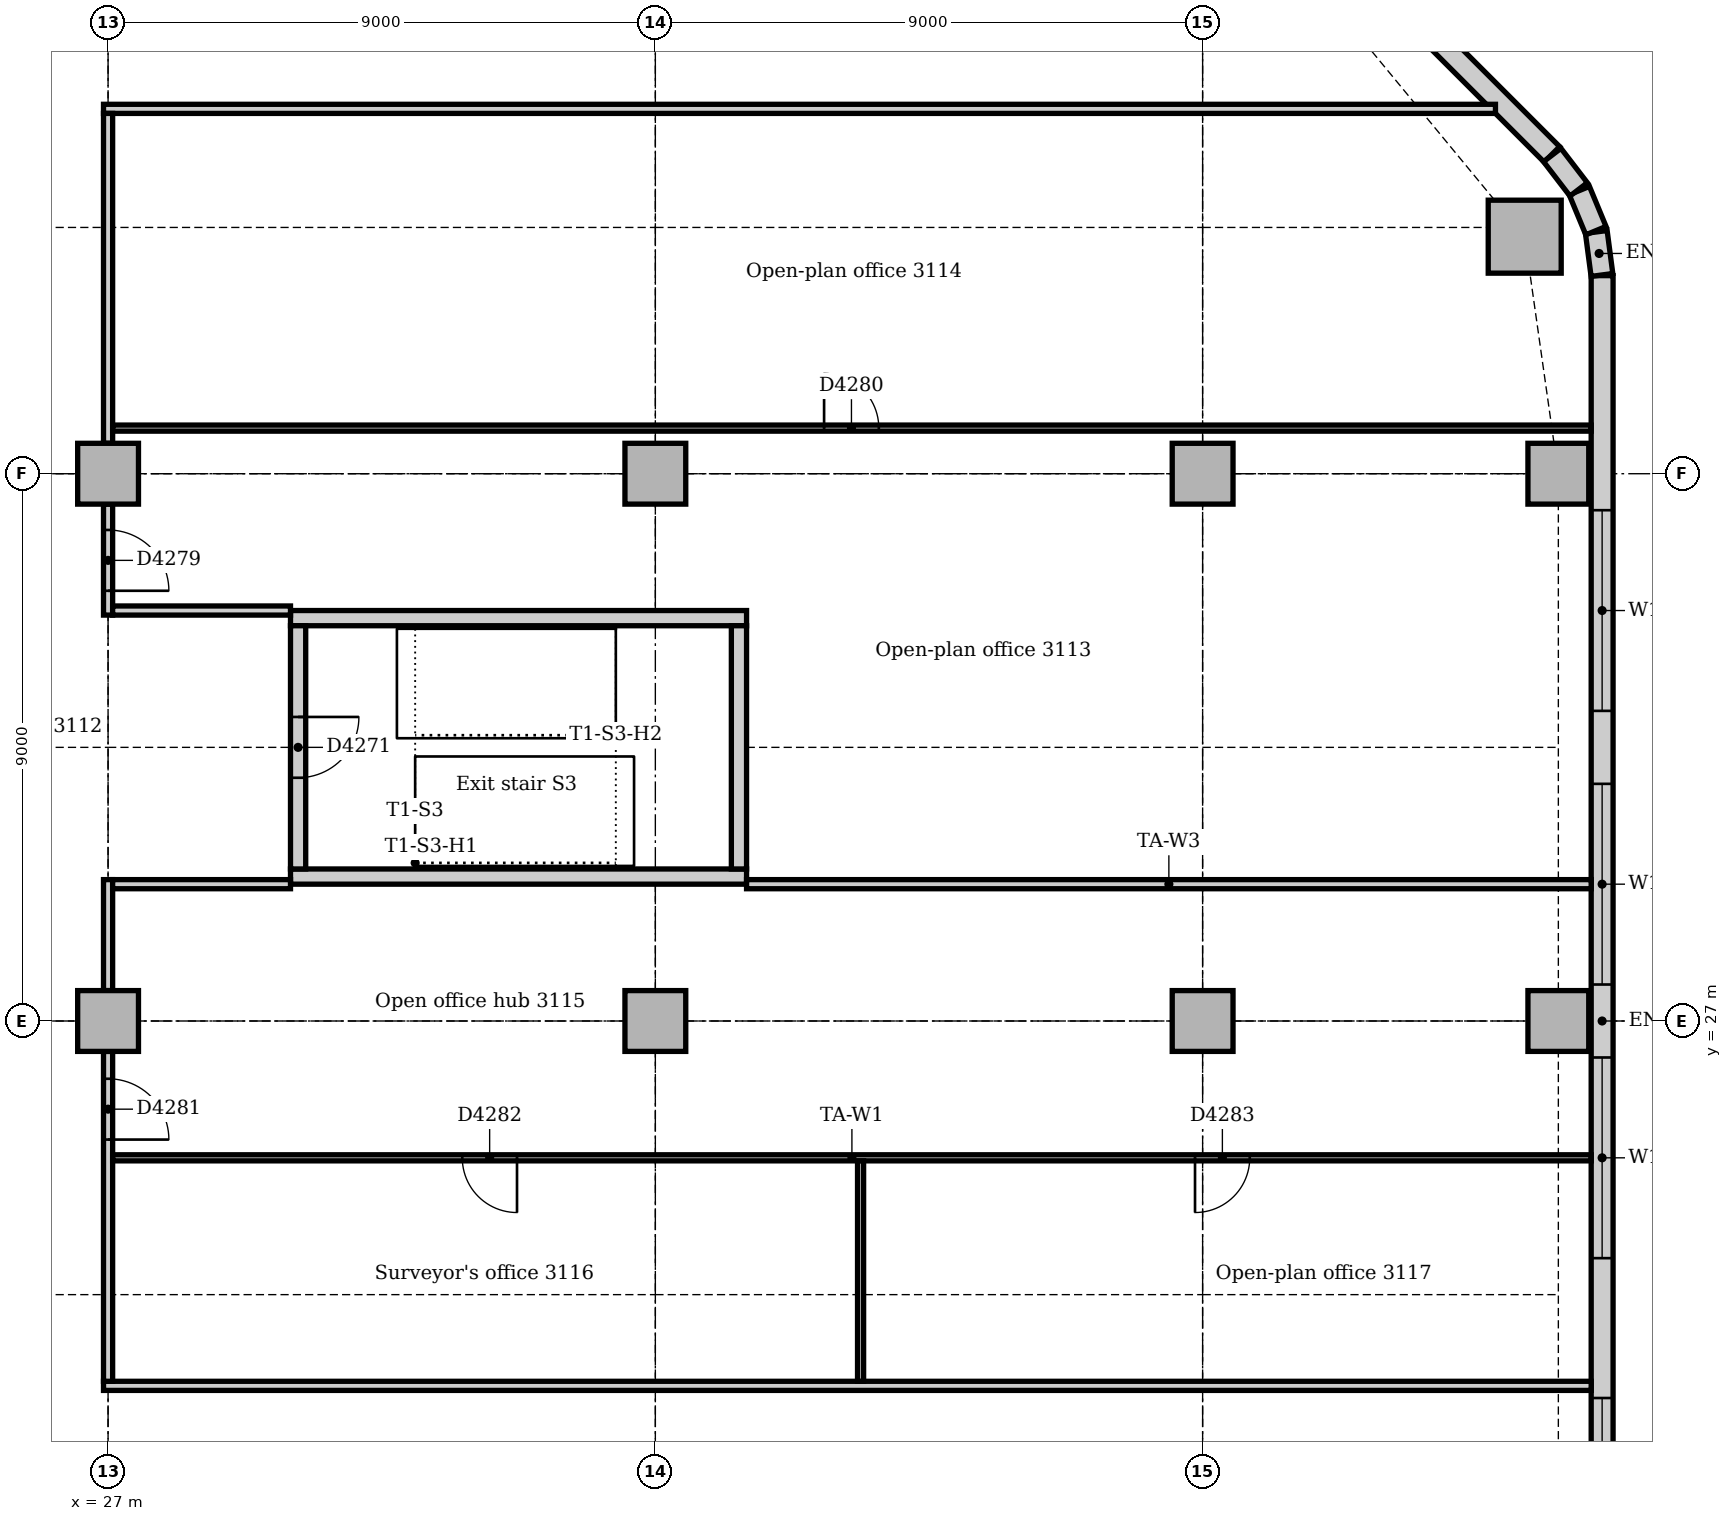
"""IFC4 building model, lengths in metres.
Left out: names, types, materials, properties, quantities, classifications, styles, units other than length and angle.
Written with IfcOpenShell. Run it as: python <this file> out.ifc"""

import sys

from ifc_helpers import new_model, si_unit, direction, frame, frame_2d, origin, origin_2d, place, context, subcontext, project, spatial, rectangle, extrude, element, fill, save


model = new_model("IFC4")
c1 = context("Model", 3, precision=1e-05, world=origin(), true_north=direction((0.0, 1.0)))
c2 = subcontext(c1, "Body", "Model", "MODEL_VIEW")
j1 = project(units=[si_unit("LENGTHUNIT", "METRE"), si_unit("PLANEANGLEUNIT", "RADIAN")], contexts=[c1])
p1 = place(None, origin())
s1 = spatial("IfcSite", under=j1, at=p1, CompositionType="ELEMENT")
p2 = place(p1, origin())
s2 = spatial("IfcBuilding", under=s1, at=p2, CompositionType="ELEMENT")
p3 = place(p2, frame((0.0, 0.0, 132.0)))
s3 = spatial("IfcBuildingStorey", under=s2, at=p3, CompositionType="ELEMENT", Elevation=132.0)
for number, where, z_axis, x_axis in (
    (1, (30.0, 29.375, 0.0), (0.0, 0.0, 1.0), (1.0, 0.0, 0.0)),
    (2, (37.5, 33.625, 0.0), (0.0, 0.0, 1.0), (-1.0, 0.0, 0.0)),
):
    element("IfcWall", number, at=place(p3, frame(where, z_axis=z_axis, x_axis=x_axis)), inside=s3, PredefinedType="SOLIDWALL", context=c2, shape_type="SweptSolid", body=[
        extrude(rectangle(XDim=7.5, YDim=0.25, at=frame_2d((3.75, 0.0))), origin(), (0.0, 0.0, 1.0), 4.0),
    ])
p4 = place(p3, frame((37.375, 29.5, 0.0), z_axis=(0.0, 0.0, 1.0), x_axis=(0.0, 1.0, 0.0)))
e3 = element("IfcWall", 3, at=p4, inside=s3, PredefinedType="SOLIDWALL", context=c2, shape_type="SweptSolid", body=[
    extrude(rectangle(XDim=4.0, YDim=0.25, at=frame_2d((2.0, 0.0))), origin(), (0.0, 0.0, 1.0), 4.0),
])
p5 = place(p3, frame((30.125, 33.5, 0.0), z_axis=(0.0, 0.0, 1.0), x_axis=(0.0, -1.0, 0.0)))
e4 = element("IfcWall", 4, at=p5, inside=s3, PredefinedType="SOLIDWALL", context=c2, shape_type="SweptSolid", body=[
    extrude(rectangle(XDim=4.0, YDim=0.25, at=frame_2d((2.0, 0.0))), origin(), (0.0, 0.0, 1.0), 4.0),
])
p6 = place(p5, frame((1.5, 0.0, 0.0)))
e5 = element("IfcOpeningElement", 5, at=p6, cuts=e4, PredefinedType="OPENING", context=c2, shape_type="SweptSolid", body=[
    extrude(rectangle(XDim=1.0, YDim=2.1, at=frame_2d((0.5, 1.05))), frame((0.0, 0.135, 0.0), z_axis=(0.0, -1.0, 0.0), x_axis=(1.0, 0.0, 0.0)), (0.0, 0.0, 1.0), 0.27),
])
p7 = place(p3, frame((50.297, 39.898, 0.0), z_axis=(0.0, 0.0, 1.0), x_axis=(1.0, 0.0, 0.0)))
e6 = element("IfcColumn", 6, at=p7, inside=s3, PredefinedType="COLUMN", context=c2, shape_type="SweptSolid", body=[
    extrude(rectangle(XDim=1.2, YDim=1.2, at=origin_2d()), origin(), (0.0, 0.0, 1.0), 3.85),
])
for number, where, z_axis, x_axis in (
    (7, (50.85, 27.0, 0.0), (0.0, 0.0, 1.0), (1.0, 0.0, 0.0)),
    (8, (50.85, 36.0, 0.0), (0.0, 0.0, 1.0), (1.0, 0.0, 0.0)),
    (9, (27.0, 27.0, 0.0), (0.0, 0.0, 1.0), (1.0, 0.0, 0.0)),
    (10, (27.0, 36.0, 0.0), (0.0, 0.0, 1.0), (1.0, 0.0, 0.0)),
    (11, (36.0, 27.0, 0.0), (0.0, 0.0, 1.0), (1.0, 0.0, 0.0)),
    (12, (36.0, 36.0, 0.0), (0.0, 0.0, 1.0), (1.0, 0.0, 0.0)),
    (13, (45.0, 27.0, 0.0), (0.0, 0.0, 1.0), (1.0, 0.0, 0.0)),
    (14, (45.0, 36.0, 0.0), (0.0, 0.0, 1.0), (1.0, 0.0, 0.0)),
):
    element("IfcColumn", number, at=place(p3, frame(where, z_axis=z_axis, x_axis=x_axis)), inside=s3, PredefinedType="COLUMN", context=c2, shape_type="SweptSolid", body=[
        extrude(rectangle(XDim=1.0, YDim=1.0, at=origin_2d()), origin(), (0.0, 0.0, 1.0), 3.85),
    ])
p8 = place(p3, frame((51.57, 14.743, 0.0), z_axis=(0.0, 0.0, 1.0), x_axis=(0.0, 1.0, 0.0)))
e15 = element("IfcWall", 15, at=p8, inside=s3, PredefinedType="STANDARD", context=c2, shape_type="SweptSolid", body=[
    extrude(rectangle(XDim=24.515, YDim=0.36, at=frame_2d((12.257, 0.0))), origin(), (0.0, 0.0, 1.0), 3.85),
])
p9 = place(p8, frame((4.257, 0.0, 0.9)))
e16 = element("IfcOpeningElement", 16, at=p9, cuts=e15, PredefinedType="OPENING", context=c2, shape_type="SweptSolid", body=[
    extrude(rectangle(XDim=1.8, YDim=1.6, at=frame_2d((0.9, 0.8))), frame((0.0, 0.19, 0.0), z_axis=(0.0, -1.0, 0.0), x_axis=(1.0, 0.0, 0.0)), (0.0, 0.0, 1.0), 0.38),
])
p10 = place(p8, frame((8.357, 0.0, 0.9)))
e17 = element("IfcOpeningElement", 17, at=p10, cuts=e15, PredefinedType="OPENING", context=c2, shape_type="SweptSolid", body=[
    extrude(rectangle(XDim=3.3, YDim=1.6, at=frame_2d((1.65, 0.8))), frame((0.0, 0.19, 0.0), z_axis=(0.0, -1.0, 0.0), x_axis=(1.0, 0.0, 0.0)), (0.0, 0.0, 1.0), 0.38),
])
p11 = place(p8, frame((12.857, 0.0, 0.9)))
e18 = element("IfcOpeningElement", 18, at=p11, cuts=e15, PredefinedType="OPENING", context=c2, shape_type="SweptSolid", body=[
    extrude(rectangle(XDim=3.3, YDim=1.6, at=frame_2d((1.65, 0.8))), frame((0.0, 0.19, 0.0), z_axis=(0.0, -1.0, 0.0), x_axis=(1.0, 0.0, 0.0)), (0.0, 0.0, 1.0), 0.38),
])
p12 = place(p8, frame((17.357, 0.0, 0.9)))
e19 = element("IfcOpeningElement", 19, at=p12, cuts=e15, PredefinedType="OPENING", context=c2, shape_type="SweptSolid", body=[
    extrude(rectangle(XDim=3.3, YDim=1.6, at=frame_2d((1.65, 0.8))), frame((0.0, 0.19, 0.0), z_axis=(0.0, -1.0, 0.0), x_axis=(1.0, 0.0, 0.0)), (0.0, 0.0, 1.0), 0.38),
])
p13 = place(p3, frame((50.744, 41.251, 0.0), z_axis=(0.0, 0.0, 1.0), x_axis=(-0.707106781187, 0.707106781187, 0.0)))
e20 = element("IfcWall", 20, at=p13, inside=s3, PredefinedType="STANDARD", context=c2, shape_type="SweptSolid", body=[
    extrude(rectangle(XDim=10.243, YDim=0.36, at=frame_2d((5.121, 0.0))), origin(), (0.0, 0.0, 1.0), 3.85),
])
p14 = place(p13, frame((3.071, 0.0, 0.9)))
e21 = element("IfcOpeningElement", 21, at=p14, cuts=e20, PredefinedType="OPENING", context=c2, shape_type="SweptSolid", body=[
    extrude(rectangle(XDim=3.3, YDim=1.6, at=frame_2d((1.65, 0.8))), frame((0.0, 0.19, 0.0), z_axis=(0.0, -1.0, 0.0), x_axis=(1.0, 0.0, 0.0)), (0.0, 0.0, 1.0), 0.38),
])
for number, where, z_axis, x_axis in (
    (22, (51.567, 39.269, 0.0), (0.0, 0.0, 1.0), (-0.131, 0.991, 0.0)),
    (23, (51.468, 39.997, 0.0), (0.0, 0.0, 1.0), (-0.383, 0.924, 0.0)),
):
    element("IfcWall", number, at=place(p3, frame(where, z_axis=z_axis, x_axis=x_axis)), inside=s3, PredefinedType="STANDARD", context=c2, shape_type="SweptSolid", body=[
        extrude(rectangle(XDim=0.713, YDim=0.36, at=frame_2d((0.356, 0.0))), origin(), (0.0, 0.0, 1.0), 3.85),
    ])
p15 = place(p3, frame((51.184, 40.675, 0.0), z_axis=(0.0, 0.0, 1.0), x_axis=(-0.608802368033, 0.793321924995, 0.0)))
e24 = element("IfcWall", 24, at=p15, inside=s3, PredefinedType="STANDARD", context=c2, shape_type="SweptSolid", body=[
    extrude(rectangle(XDim=0.713, YDim=0.36, at=frame_2d((0.357, 0.0))), origin(), (0.0, 0.0, 1.0), 3.85),
])
p16 = place(p3, frame((26.925, 21.0, 0.0), z_axis=(0.0, 0.0, 1.0), x_axis=(1.0, 0.0, 0.0)))
e25 = element("IfcWall", 25, at=p16, inside=s3, PredefinedType="PARTITIONING", context=c2, shape_type="SweptSolid", body=[
    extrude(rectangle(XDim=24.465, YDim=0.15, at=frame_2d((12.232, 0.0))), origin(), (0.0, 0.0, 1.0), 3.85),
])
p17 = place(p3, frame((26.925, 42.0, 0.0), z_axis=(0.0, 0.0, 1.0), x_axis=(1.0, 0.0, 0.0)))
e26 = element("IfcWall", 26, at=p17, inside=s3, PredefinedType="PARTITIONING", context=c2, shape_type="SweptSolid", body=[
    extrude(rectangle(XDim=22.891, YDim=0.15, at=frame_2d((11.445, 0.0))), origin(), (0.0, 0.0, 1.0), 3.85),
])
p18 = place(p3, frame((27.0, 21.075, 0.0), z_axis=(0.0, 0.0, 1.0), x_axis=(0.0, 1.0, 0.0)))
e27 = element("IfcWall", 27, at=p18, inside=s3, PredefinedType="PARTITIONING", context=c2, shape_type="SweptSolid", body=[
    extrude(rectangle(XDim=5.425, YDim=0.15, at=frame_2d((2.712, 0.0))), origin(), (0.0, 0.0, 1.0), 3.256),
])
p19 = place(p18, frame((3.975, 0.0, 0.0)))
e28 = element("IfcOpeningElement", 28, at=p19, cuts=e27, PredefinedType="OPENING", context=c2, shape_type="SweptSolid", body=[
    extrude(rectangle(XDim=1.0, YDim=2.1, at=frame_2d((0.5, 1.05))), frame((0.0, 0.085, 0.0), z_axis=(0.0, -1.0, 0.0), x_axis=(1.0, 0.0, 0.0)), (0.0, 0.0, 1.0), 0.17),
])
p20 = place(p3, frame((27.0, 27.5, 0.0), z_axis=(0.0, 0.0, 1.0), x_axis=(0.0, 1.0, 0.0)))
e29 = element("IfcWall", 29, at=p20, inside=s3, PredefinedType="PARTITIONING", context=c2, shape_type="SweptSolid", body=[
    extrude(rectangle(XDim=1.825, YDim=0.15, at=frame_2d((0.912, 0.0))), origin(), (0.0, 0.0, 1.0), 3.256),
])
p21 = place(p3, frame((27.0, 33.675, 0.0), z_axis=(0.0, 0.0, 1.0), x_axis=(0.0, 1.0, 0.0)))
e30 = element("IfcWall", 30, at=p21, inside=s3, PredefinedType="PARTITIONING", context=c2, shape_type="SweptSolid", body=[
    extrude(rectangle(XDim=1.825, YDim=0.15, at=frame_2d((0.912, 0.0))), origin(), (0.0, 0.0, 1.0), 3.256),
])
p22 = place(p21, frame((0.4, 0.0, 0.0)))
e31 = element("IfcOpeningElement", 31, at=p22, cuts=e30, PredefinedType="OPENING", context=c2, shape_type="SweptSolid", body=[
    extrude(rectangle(XDim=1.0, YDim=2.1, at=frame_2d((0.5, 1.05))), frame((0.0, 0.085, 0.0), z_axis=(0.0, -1.0, 0.0), x_axis=(1.0, 0.0, 0.0)), (0.0, 0.0, 1.0), 0.17),
])
p23 = place(p3, frame((27.0, 36.5, 0.0), z_axis=(0.0, 0.0, 1.0), x_axis=(0.0, 1.0, 0.0)))
e32 = element("IfcWall", 32, at=p23, inside=s3, PredefinedType="PARTITIONING", context=c2, shape_type="SweptSolid", body=[
    extrude(rectangle(XDim=5.425, YDim=0.15, at=frame_2d((2.712, 0.0))), origin(), (0.0, 0.0, 1.0), 3.256),
])
for number, where, z_axis, x_axis in (
    (33, (27.075, 29.25, 0.0), (0.0, 0.0, 1.0), (1.0, 0.0, 0.0)),
    (34, (27.075, 33.75, 0.0), (0.0, 0.0, 1.0), (1.0, 0.0, 0.0)),
):
    element("IfcWall", number, at=place(p3, frame(where, z_axis=z_axis, x_axis=x_axis)), inside=s3, PredefinedType="PARTITIONING", context=c2, shape_type="SweptSolid", body=[
        extrude(rectangle(XDim=2.925, YDim=0.15, at=frame_2d((1.462, 0.0))), origin(), (0.0, 0.0, 1.0), 3.85),
    ])
p24 = place(p3, frame((37.5, 29.25, 0.0), z_axis=(0.0, 0.0, 1.0), x_axis=(1.0, 0.0, 0.0)))
e35 = element("IfcWall", 35, at=p24, inside=s3, PredefinedType="PARTITIONING", context=c2, shape_type="SweptSolid", body=[
    extrude(rectangle(XDim=13.89, YDim=0.15, at=frame_2d((6.945, 0.0))), origin(), (0.0, 0.0, 1.0), 3.85),
])
p25 = place(p3, frame((27.075, 24.75, 0.0), z_axis=(0.0, 0.0, 1.0), x_axis=(1.0, 0.0, 0.0)))
e36 = element("IfcWall", 36, at=p25, inside=s3, PredefinedType="PARTITIONING", context=c2, shape_type="SweptSolid", body=[
    extrude(rectangle(XDim=24.315, YDim=0.1, at=frame_2d((12.158, 0.0))), origin(), (0.0, 0.0, 1.0), 3.85),
])
p26 = place(p25, frame((5.75, 0.0, 0.0)))
e37 = element("IfcOpeningElement", 37, at=p26, cuts=e36, PredefinedType="OPENING", context=c2, shape_type="SweptSolid", body=[
    extrude(rectangle(XDim=0.9, YDim=2.1, at=frame_2d((0.45, 1.05))), frame((0.0, 0.06, 0.0), z_axis=(0.0, -1.0, 0.0), x_axis=(1.0, 0.0, 0.0)), (0.0, 0.0, 1.0), 0.12),
])
p27 = place(p25, frame((17.8, 0.0, 0.0)))
e38 = element("IfcOpeningElement", 38, at=p27, cuts=e36, PredefinedType="OPENING", context=c2, shape_type="SweptSolid", body=[
    extrude(rectangle(XDim=0.9, YDim=2.1, at=frame_2d((0.45, 1.05))), frame((0.0, 0.06, 0.0), z_axis=(0.0, -1.0, 0.0), x_axis=(1.0, 0.0, 0.0)), (0.0, 0.0, 1.0), 0.12),
])
p28 = place(p3, frame((27.075, 36.75, 0.0), z_axis=(0.0, 0.0, 1.0), x_axis=(1.0, 0.0, 0.0)))
e39 = element("IfcWall", 39, at=p28, inside=s3, PredefinedType="PARTITIONING", context=c2, shape_type="SweptSolid", body=[
    extrude(rectangle(XDim=24.315, YDim=0.1, at=frame_2d((12.158, 0.0))), origin(), (0.0, 0.0, 1.0), 3.85),
])
p29 = place(p28, frame((11.7, 0.0, 0.0)))
e40 = element("IfcOpeningElement", 40, at=p29, cuts=e39, PredefinedType="OPENING", context=c2, shape_type="SweptSolid", body=[
    extrude(rectangle(XDim=0.9, YDim=2.1, at=frame_2d((0.45, 1.05))), frame((0.0, 0.06, 0.0), z_axis=(0.0, -1.0, 0.0), x_axis=(1.0, 0.0, 0.0)), (0.0, 0.0, 1.0), 0.12),
])
p30 = place(p3, frame((39.375, 21.075, 0.0), z_axis=(0.0, 0.0, 1.0), x_axis=(0.0, 1.0, 0.0)))
e41 = element("IfcWall", 41, at=p30, inside=s3, PredefinedType="PARTITIONING", context=c2, shape_type="SweptSolid", body=[
    extrude(rectangle(XDim=3.625, YDim=0.1, at=frame_2d((1.812, 0.0))), origin(), (0.0, 0.0, 1.0), 3.85),
])
p31 = place(p9, origin())
e42 = element("IfcWindow", 42, at=p31, inside=s3, PartitioningType="SINGLE_PANEL", PredefinedType="WINDOW", context=c2, shape_type="SweptSolid", body=[
    extrude(rectangle(XDim=1.8, YDim=1.6, at=frame_2d((0.9, 0.8))), frame((0.0, 0.13, 0.0), z_axis=(0.0, -1.0, 0.0), x_axis=(1.0, 0.0, 0.0)), (0.0, 0.0, 1.0), 0.06),
])
fill(e16, e42)
p32 = place(p10, origin())
e43 = element("IfcWindow", 43, at=p32, inside=s3, PartitioningType="SINGLE_PANEL", PredefinedType="WINDOW", context=c2, shape_type="SweptSolid", body=[
    extrude(rectangle(XDim=3.3, YDim=1.6, at=frame_2d((1.65, 0.8))), frame((0.0, 0.13, 0.0), z_axis=(0.0, -1.0, 0.0), x_axis=(1.0, 0.0, 0.0)), (0.0, 0.0, 1.0), 0.06),
])
fill(e17, e43)
p33 = place(p11, origin())
e44 = element("IfcWindow", 44, at=p33, inside=s3, PartitioningType="SINGLE_PANEL", PredefinedType="WINDOW", context=c2, shape_type="SweptSolid", body=[
    extrude(rectangle(XDim=3.3, YDim=1.6, at=frame_2d((1.65, 0.8))), frame((0.0, 0.13, 0.0), z_axis=(0.0, -1.0, 0.0), x_axis=(1.0, 0.0, 0.0)), (0.0, 0.0, 1.0), 0.06),
])
fill(e18, e44)
p34 = place(p12, origin())
e45 = element("IfcWindow", 45, at=p34, inside=s3, PartitioningType="SINGLE_PANEL", PredefinedType="WINDOW", context=c2, shape_type="SweptSolid", body=[
    extrude(rectangle(XDim=3.3, YDim=1.6, at=frame_2d((1.65, 0.8))), frame((0.0, 0.13, 0.0), z_axis=(0.0, -1.0, 0.0), x_axis=(1.0, 0.0, 0.0)), (0.0, 0.0, 1.0), 0.06),
])
fill(e19, e45)
p35 = place(p6, origin())
e46 = element("IfcDoor", 46, at=p35, inside=s3, OperationType="SINGLE_SWING_LEFT", PredefinedType="DOOR", context=c2, shape_type="SweptSolid", body=[
    extrude(rectangle(XDim=1.0, YDim=2.1, at=frame_2d((0.5, 1.05))), frame((0.0, 0.025, 0.0), z_axis=(0.0, -1.0, 0.0), x_axis=(1.0, 0.0, 0.0)), (0.0, 0.0, 1.0), 0.05),
])
fill(e5, e46)
p36 = place(p22, frame((1.0, 0.0, 0.0), z_axis=(0.0, 0.0, 1.0), x_axis=(-1.0, 0.0, 0.0)))
e47 = element("IfcDoor", 47, at=p36, inside=s3, OperationType="SINGLE_SWING_RIGHT", PredefinedType="DOOR", context=c2, shape_type="SweptSolid", body=[
    extrude(rectangle(XDim=1.0, YDim=2.1, at=frame_2d((0.5, 1.05))), frame((0.0, 0.025, 0.0), z_axis=(0.0, -1.0, 0.0), x_axis=(1.0, 0.0, 0.0)), (0.0, 0.0, 1.0), 0.05),
])
fill(e31, e47)
p37 = place(p29, origin())
e48 = element("IfcDoor", 48, at=p37, inside=s3, OperationType="SINGLE_SWING_LEFT", PredefinedType="DOOR", context=c2, shape_type="SweptSolid", body=[
    extrude(rectangle(XDim=0.9, YDim=2.1, at=frame_2d((0.45, 1.05))), frame((0.0, 0.025, 0.0), z_axis=(0.0, -1.0, 0.0), x_axis=(1.0, 0.0, 0.0)), (0.0, 0.0, 1.0), 0.05),
])
fill(e40, e48)
p38 = place(p19, frame((1.0, 0.0, 0.0), z_axis=(0.0, 0.0, 1.0), x_axis=(-1.0, 0.0, 0.0)))
e49 = element("IfcDoor", 49, at=p38, inside=s3, OperationType="SINGLE_SWING_RIGHT", PredefinedType="DOOR", context=c2, shape_type="SweptSolid", body=[
    extrude(rectangle(XDim=1.0, YDim=2.1, at=frame_2d((0.5, 1.05))), frame((0.0, 0.025, 0.0), z_axis=(0.0, -1.0, 0.0), x_axis=(1.0, 0.0, 0.0)), (0.0, 0.0, 1.0), 0.05),
])
fill(e28, e49)
p39 = place(p26, frame((0.9, 0.0, 0.0), z_axis=(0.0, 0.0, 1.0), x_axis=(-1.0, 0.0, 0.0)))
e50 = element("IfcDoor", 50, at=p39, inside=s3, OperationType="SINGLE_SWING_LEFT", PredefinedType="DOOR", context=c2, shape_type="SweptSolid", body=[
    extrude(rectangle(XDim=0.9, YDim=2.1, at=frame_2d((0.45, 1.05))), frame((0.0, 0.025, 0.0), z_axis=(0.0, -1.0, 0.0), x_axis=(1.0, 0.0, 0.0)), (0.0, 0.0, 1.0), 0.05),
])
fill(e37, e50)
p40 = place(p27, frame((0.9, 0.0, 0.0), z_axis=(0.0, 0.0, 1.0), x_axis=(-1.0, 0.0, 0.0)))
e51 = element("IfcDoor", 51, at=p40, inside=s3, OperationType="SINGLE_SWING_RIGHT", PredefinedType="DOOR", context=c2, shape_type="SweptSolid", body=[
    extrude(rectangle(XDim=0.9, YDim=2.1, at=frame_2d((0.45, 1.05))), frame((0.0, 0.025, 0.0), z_axis=(0.0, -1.0, 0.0), x_axis=(1.0, 0.0, 0.0)), (0.0, 0.0, 1.0), 0.05),
])
fill(e38, e51)
save(model, sys.argv[1])
